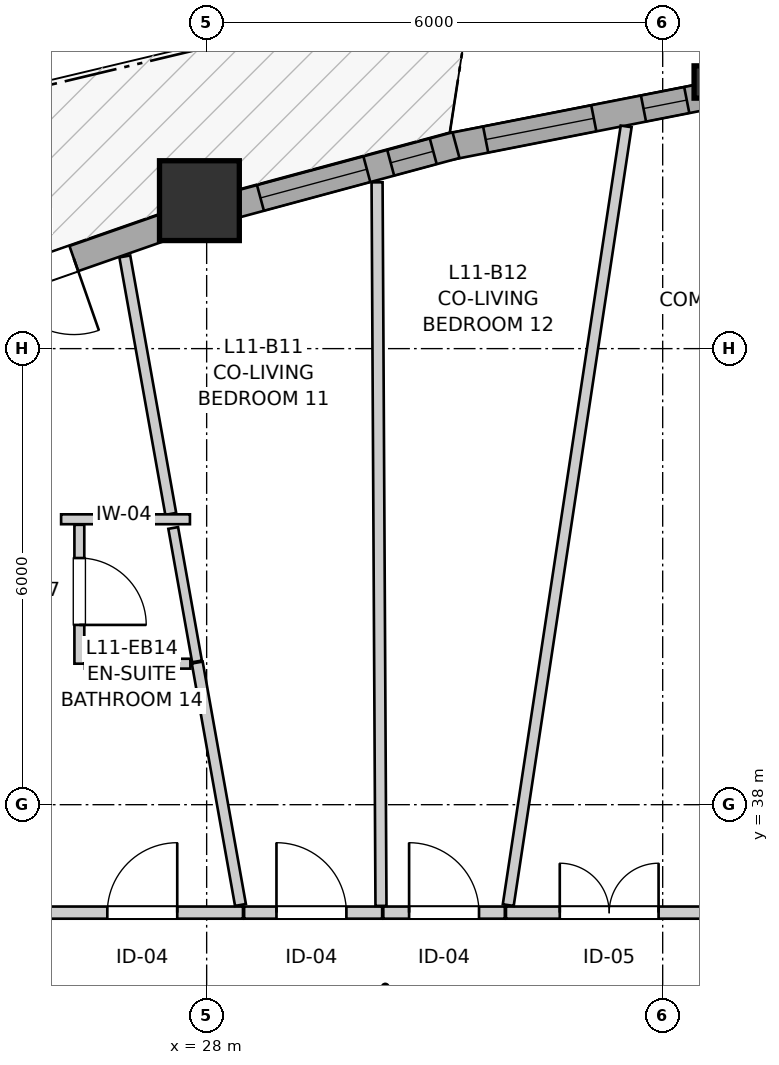
"""IFC4 building model, lengths in metres.
Left out: names, types, materials, properties, quantities, classifications, styles, units other than length and angle.
Written with IfcOpenShell. Run it as: python <this file> out.ifc"""

import sys

from ifc_helpers import new_model, si_unit, direction, frame, frame_2d, origin, origin_2d, place, context, subcontext, project, spatial, rectangle, i_section, extrude, source, transform, mapped, element, fill, save


model = new_model("IFC4")
c1 = context("Model", 3, precision=1e-05, world=origin(), true_north=direction((0.0, 1.0)))
c2 = subcontext(c1, "Body", "Model", "MODEL_VIEW")
j1 = project(units=[si_unit("LENGTHUNIT", "METRE"), si_unit("PLANEANGLEUNIT", "RADIAN")], contexts=[c1])
p1 = place(None, origin())
s1 = spatial("IfcSite", under=j1, at=p1, CompositionType="ELEMENT")
p2 = place(p1, origin())
s2 = spatial("IfcBuilding", under=s1, at=p2, CompositionType="ELEMENT")
p3 = place(p2, frame((0.0, 0.0, 39.8)))
s3 = spatial("IfcBuildingStorey", under=s2, at=p3, CompositionType="ELEMENT", Elevation=39.8)
m1 = source(origin(), c2, "Body", "SweptSolid", [
    extrude(i_section(OverallWidth=0.409, OverallDepth=0.425, WebThickness=0.03, FlangeThickness=0.048, FilletRadius=0.015, at=origin_2d()), origin(), (0.0, 0.0, 1.0), 2.94),
])
p4 = place(p3, frame((34.617, 47.508, 0.0), z_axis=(0.0, 0.0, 1.0), x_axis=(1.0, 0.0, 0.0)))
e1 = element("IfcColumn", 1, at=p4, inside=s3, PredefinedType="PILASTER", context=c2, shape_type="MappedRepresentation", body=[
    mapped(m1, transform((0.0, 0.0, 0.0), x_axis=(1.0, 0.0, 0.0), y_axis=(0.0, 1.0, 0.0), z_axis=(0.0, 0.0, 1.0), scale=1.0)),
])
m2 = source(origin(), c2, "Body", "SweptSolid", [
    extrude(rectangle(XDim=1.05, YDim=1.05, at=origin_2d()), origin(), (0.0, 0.0, 1.0), 2.94),
])
p5 = place(p3, frame((27.905, 45.947, 0.0), z_axis=(0.0, 0.0, 1.0), x_axis=(1.0, 0.0, 0.0)))
e2 = element("IfcColumn", 2, at=p5, inside=s3, PredefinedType="COLUMN", context=c2, shape_type="MappedRepresentation", body=[
    mapped(m2, transform((0.0, 0.0, 0.0), x_axis=(1.0, 0.0, 0.0), y_axis=(0.0, 1.0, 0.0), z_axis=(0.0, 0.0, 1.0), scale=1.0)),
])
p6 = place(p3, frame((34.632, 47.332, 0.0), z_axis=(0.0, 0.0, 1.0), x_axis=(-0.981234691866, -0.192817217796, 0.0)))
e3 = element("IfcWall", 3, at=p6, inside=s3, PredefinedType="SOLIDWALL", context=c2, shape_type="SweptSolid", body=[
    extrude(rectangle(XDim=3.502, YDim=0.35, at=frame_2d((1.751, 0.0))), origin(), (0.0, 0.0, 1.0), 2.42),
])
p7 = place(p6, frame((0.321, 0.0, 0.82)))
e4 = element("IfcOpeningElement", 4, at=p7, cuts=e3, PredefinedType="OPENING", context=c2, shape_type="SweptSolid", body=[
    extrude(rectangle(XDim=0.58, YDim=1.35, at=frame_2d((0.29, 0.675))), frame((0.0, 0.185, 0.0), z_axis=(0.0, -1.0, 0.0), x_axis=(1.0, 0.0, 0.0)), (0.0, 0.0, 1.0), 0.37),
])
p8 = place(p6, frame((1.567, 0.0, 0.82)))
e5 = element("IfcOpeningElement", 5, at=p8, cuts=e3, PredefinedType="OPENING", context=c2, shape_type="SweptSolid", body=[
    extrude(rectangle(XDim=1.45, YDim=1.25, at=frame_2d((0.725, 0.625))), frame((0.0, 0.185, 0.0), z_axis=(0.0, -1.0, 0.0), x_axis=(1.0, 0.0, 0.0)), (0.0, 0.0, 1.0), 0.37),
])
p9 = place(p3, frame((31.281, 46.677, 0.0), z_axis=(0.0, 0.0, 1.0), x_axis=(-0.965445661484, -0.260604441101, 0.0)))
e6 = element("IfcWall", 6, at=p9, inside=s3, PredefinedType="SOLIDWALL", context=c2, shape_type="SweptSolid", body=[
    extrude(rectangle(XDim=3.15, YDim=0.35, at=frame_2d((1.575, 0.0))), origin(), (0.0, 0.0, 1.0), 2.42),
])
p10 = place(p9, frame((0.31, 0.0, 0.82)))
e7 = element("IfcOpeningElement", 7, at=p10, cuts=e6, PredefinedType="OPENING", context=c2, shape_type="SweptSolid", body=[
    extrude(rectangle(XDim=0.58, YDim=1.35, at=frame_2d((0.29, 0.675))), frame((0.0, 0.185, 0.0), z_axis=(0.0, -1.0, 0.0), x_axis=(1.0, 0.0, 0.0)), (0.0, 0.0, 1.0), 0.37),
])
p11 = place(p9, frame((1.215, 0.0, 0.82)))
e8 = element("IfcOpeningElement", 8, at=p11, cuts=e6, PredefinedType="OPENING", context=c2, shape_type="SweptSolid", body=[
    extrude(rectangle(XDim=1.45, YDim=1.25, at=frame_2d((0.725, 0.625))), frame((0.0, 0.185, 0.0), z_axis=(0.0, -1.0, 0.0), x_axis=(1.0, 0.0, 0.0)), (0.0, 0.0, 1.0), 0.37),
])
p12 = place(p3, frame((27.679, 45.683, 0.0), z_axis=(0.0, 0.0, 1.0), x_axis=(-0.944147093892, -0.32952430122, 0.0)))
e9 = element("IfcWall", 9, at=p12, inside=s3, PredefinedType="SOLIDWALL", context=c2, shape_type="SweptSolid", body=[
    extrude(rectangle(XDim=3.094, YDim=0.35, at=frame_2d((1.547, 0.0))), origin(), (0.0, 0.0, 1.0), 2.42),
])
p13 = place(p12, frame((1.511, 0.0, 0.0)))
e10 = element("IfcOpeningElement", 10, at=p13, cuts=e9, PredefinedType="OPENING", context=c2, shape_type="SweptSolid", body=[
    extrude(rectangle(XDim=1.0, YDim=2.1, at=frame_2d((0.5, 1.05))), frame((0.0, 0.185, 0.0), z_axis=(0.0, -1.0, 0.0), x_axis=(1.0, 0.0, 0.0)), (0.0, 0.0, 1.0), 0.37),
])
p14 = place(p3, frame((31.938, 36.58, 0.0), z_axis=(0.0, 0.0, 1.0), x_axis=(1.0, 0.0, 0.0)))
e11 = element("IfcWall", 11, at=p14, inside=s3, PredefinedType="PARTITIONING", context=c2, shape_type="SweptSolid", body=[
    extrude(rectangle(XDim=2.718, YDim=0.16, at=frame_2d((1.359, 0.0))), origin(), (0.0, 0.0, 1.0), 2.94),
])
p15 = place(p14, frame((0.708, 0.0, 0.0)))
e12 = element("IfcOpeningElement", 12, at=p15, cuts=e11, PredefinedType="OPENING", context=c2, shape_type="SweptSolid", body=[
    extrude(rectangle(XDim=1.3, YDim=2.1, at=frame_2d((0.65, 1.05))), frame((0.0, 0.09, 0.0), z_axis=(0.0, -1.0, 0.0), x_axis=(1.0, 0.0, 0.0)), (0.0, 0.0, 1.0), 0.18),
])
p16 = place(p3, frame((25.874, 36.58, 0.0), z_axis=(0.0, 0.0, 1.0), x_axis=(1.0, 0.0, 0.0)))
e13 = element("IfcWall", 13, at=p16, inside=s3, PredefinedType="PARTITIONING", context=c2, shape_type="SweptSolid", body=[
    extrude(rectangle(XDim=2.604, YDim=0.16, at=frame_2d((1.302, 0.0))), origin(), (0.0, 0.0, 1.0), 2.94),
])
p17 = place(p16, frame((0.819, 0.0, 0.0)))
e14 = element("IfcOpeningElement", 14, at=p17, cuts=e13, PredefinedType="OPENING", context=c2, shape_type="SweptSolid", body=[
    extrude(rectangle(XDim=0.92, YDim=2.1, at=frame_2d((0.46, 1.05))), frame((0.0, 0.09, 0.0), z_axis=(0.0, -1.0, 0.0), x_axis=(1.0, 0.0, 0.0)), (0.0, 0.0, 1.0), 0.18),
])
p18 = place(p3, frame((26.325, 41.682, 0.0), z_axis=(0.0, 0.0, 1.0), x_axis=(0.0, -1.0, 0.0)))
e15 = element("IfcWall", 15, at=p18, inside=s3, PredefinedType="PARTITIONING", context=c2, shape_type="SweptSolid", body=[
    extrude(rectangle(XDim=1.827, YDim=0.13, at=frame_2d((0.914, 0.0))), origin(), (0.0, 0.0, 1.0), 2.94),
])
p19 = place(p18, frame((0.437, 0.0, 0.0)))
e16 = element("IfcOpeningElement", 16, at=p19, cuts=e15, PredefinedType="OPENING", context=c2, shape_type="SweptSolid", body=[
    extrude(rectangle(XDim=0.88, YDim=2.05, at=frame_2d((0.44, 1.025))), frame((0.0, 0.075, 0.0), z_axis=(0.0, -1.0, 0.0), x_axis=(1.0, 0.0, 0.0)), (0.0, 0.0, 1.0), 0.15),
])
p20 = place(p3, frame((28.493, 36.58, 0.0), z_axis=(0.0, 0.0, 1.0), x_axis=(1.0, 0.0, 0.0)))
e17 = element("IfcWall", 17, at=p20, inside=s3, PredefinedType="PARTITIONING", context=c2, shape_type="SweptSolid", body=[
    extrude(rectangle(XDim=1.816, YDim=0.16, at=frame_2d((0.908, 0.0))), origin(), (0.0, 0.0, 1.0), 2.94),
])
p21 = place(p20, frame((0.426, 0.0, 0.0)))
e18 = element("IfcOpeningElement", 18, at=p21, cuts=e17, PredefinedType="OPENING", context=c2, shape_type="SweptSolid", body=[
    extrude(rectangle(XDim=0.92, YDim=2.1, at=frame_2d((0.46, 1.05))), frame((0.0, 0.09, 0.0), z_axis=(0.0, -1.0, 0.0), x_axis=(1.0, 0.0, 0.0)), (0.0, 0.0, 1.0), 0.18),
])
p22 = place(p3, frame((30.324, 36.58, 0.0), z_axis=(0.0, 0.0, 1.0), x_axis=(1.0, 0.0, 0.0)))
e19 = element("IfcWall", 19, at=p22, inside=s3, PredefinedType="PARTITIONING", context=c2, shape_type="SweptSolid", body=[
    extrude(rectangle(XDim=1.599, YDim=0.16, at=frame_2d((0.8, 0.0))), origin(), (0.0, 0.0, 1.0), 2.94),
])
p23 = place(p22, frame((0.34, 0.0, 0.0)))
e20 = element("IfcOpeningElement", 20, at=p23, cuts=e19, PredefinedType="OPENING", context=c2, shape_type="SweptSolid", body=[
    extrude(rectangle(XDim=0.92, YDim=2.1, at=frame_2d((0.46, 1.05))), frame((0.0, 0.09, 0.0), z_axis=(0.0, -1.0, 0.0), x_axis=(1.0, 0.0, 0.0)), (0.0, 0.0, 1.0), 0.18),
])
p24 = place(p3, frame((31.968, 36.679, 0.0), z_axis=(0.0, 0.0, 1.0), x_axis=(0.149735581821, 0.9887260771, 0.0)))
e21 = element("IfcWall", 21, at=p24, inside=s3, PredefinedType="PARTITIONING", context=c2, shape_type="SweptSolid", body=[
    extrude(rectangle(XDim=10.362, YDim=0.145, at=frame_2d((5.181, 0.0))), origin(), (0.0, 0.0, 1.0), 2.94),
])
p25 = place(p3, frame((30.242, 46.188, 0.0), z_axis=(0.0, 0.0, 1.0), x_axis=(0.00538564204, -0.999985497325, 0.0)))
e22 = element("IfcWall", 22, at=p25, inside=s3, PredefinedType="PARTITIONING", context=c2, shape_type="SweptSolid", body=[
    extrude(rectangle(XDim=9.52, YDim=0.145, at=frame_2d((4.76, 0.0))), origin(), (0.0, 0.0, 1.0), 2.94),
])
p26 = place(p3, frame((26.923, 45.213, 0.0), z_axis=(0.0, 0.0, 1.0), x_axis=(0.175687492323, -0.98444598889, 0.0)))
e23 = element("IfcWall", 23, at=p26, inside=s3, PredefinedType="PARTITIONING", context=c2, shape_type="SweptSolid", body=[
    extrude(rectangle(XDim=3.441, YDim=0.145, at=frame_2d((1.72, 0.0))), origin(), (0.0, 0.0, 1.0), 2.94),
])
p27 = place(p3, frame((27.876, 39.87, 0.0), z_axis=(0.0, 0.0, 1.0), x_axis=(0.175655014507, -0.984451784436, 0.0)))
e24 = element("IfcWall", 24, at=p27, inside=s3, PredefinedType="PARTITIONING", context=c2, shape_type="SweptSolid", body=[
    extrude(rectangle(XDim=3.24, YDim=0.145, at=frame_2d((1.62, 0.0))), origin(), (0.0, 0.0, 1.0), 2.94),
])
p28 = place(p3, frame((27.56, 41.641, 0.0), z_axis=(0.0, 0.0, 1.0), x_axis=(0.175463771609, -0.9844858886, 0.0)))
e25 = element("IfcWall", 25, at=p28, inside=s3, PredefinedType="PARTITIONING", context=c2, shape_type="SweptSolid", body=[
    extrude(rectangle(XDim=1.784, YDim=0.13, at=frame_2d((0.892, 0.0))), origin(), (0.0, 0.0, 1.0), 2.94),
])
p29 = place(p3, frame((26.398, 39.855, 0.0), z_axis=(0.0, 0.0, 1.0), x_axis=(1.0, 0.0, 0.0)))
e26 = element("IfcWall", 26, at=p29, inside=s3, PredefinedType="PARTITIONING", context=c2, shape_type="SweptSolid", body=[
    extrude(rectangle(XDim=1.388, YDim=0.13, at=frame_2d((0.694, 0.0))), origin(), (0.0, 0.0, 1.0), 2.94),
])
p30 = place(p3, frame((26.085, 41.755, 0.0), z_axis=(0.0, 0.0, 1.0), x_axis=(1.0, 0.0, 0.0)))
e27 = element("IfcWall", 27, at=p30, inside=s3, PredefinedType="PARTITIONING", context=c2, shape_type="SweptSolid", body=[
    extrude(rectangle(XDim=1.695, YDim=0.13, at=frame_2d((0.848, 0.0))), origin(), (0.0, 0.0, 1.0), 2.508),
])
m3 = source(origin(), c2, "Body", "SweptSolid", [
    extrude(rectangle(XDim=0.58, YDim=1.35, at=frame_2d((0.29, 0.675))), frame((0.0, 0.03, 0.0), z_axis=(0.0, -1.0, 0.0), x_axis=(1.0, 0.0, 0.0)), (0.0, 0.0, 1.0), 0.06),
])
p31 = place(p7, origin())
e28 = element("IfcWindow", 28, at=p31, inside=s3, PartitioningType="SINGLE_PANEL", PredefinedType="WINDOW", context=c2, shape_type="MappedRepresentation", body=[
    mapped(m3, transform((0.0, 0.0, 0.0), x_axis=(1.0, 0.0, 0.0), y_axis=(0.0, 1.0, 0.0), z_axis=(0.0, 0.0, 1.0), scale=1.0)),
])
fill(e4, e28)
m4 = source(origin(), c2, "Body", "SweptSolid", [
    extrude(rectangle(XDim=1.45, YDim=1.25, at=frame_2d((0.725, 0.625))), frame((0.0, 0.03, 0.0), z_axis=(0.0, -1.0, 0.0), x_axis=(1.0, 0.0, 0.0)), (0.0, 0.0, 1.0), 0.06),
])
p32 = place(p8, origin())
e29 = element("IfcWindow", 29, at=p32, inside=s3, PartitioningType="SINGLE_PANEL", PredefinedType="WINDOW", context=c2, shape_type="MappedRepresentation", body=[
    mapped(m4, transform((0.0, 0.0, 0.0), x_axis=(1.0, 0.0, 0.0), y_axis=(0.0, 1.0, 0.0), z_axis=(0.0, 0.0, 1.0), scale=1.0)),
])
fill(e5, e29)
p33 = place(p10, origin())
e30 = element("IfcWindow", 30, at=p33, inside=s3, PartitioningType="SINGLE_PANEL", PredefinedType="WINDOW", context=c2, shape_type="MappedRepresentation", body=[
    mapped(m3, transform((0.0, 0.0, 0.0), x_axis=(1.0, 0.0, 0.0), y_axis=(0.0, 1.0, 0.0), z_axis=(0.0, 0.0, 1.0), scale=1.0)),
])
fill(e7, e30)
p34 = place(p11, origin())
e31 = element("IfcWindow", 31, at=p34, inside=s3, PartitioningType="SINGLE_PANEL", PredefinedType="WINDOW", context=c2, shape_type="MappedRepresentation", body=[
    mapped(m4, transform((0.0, 0.0, 0.0), x_axis=(1.0, 0.0, 0.0), y_axis=(0.0, 1.0, 0.0), z_axis=(0.0, 0.0, 1.0), scale=1.0)),
])
fill(e8, e31)
m5 = source(origin(), c2, "Body", "SweptSolid", [
    extrude(rectangle(XDim=1.0, YDim=2.1, at=frame_2d((0.5, 1.05))), frame((0.0, 0.025, 0.0), z_axis=(0.0, -1.0, 0.0), x_axis=(1.0, 0.0, 0.0)), (0.0, 0.0, 1.0), 0.05),
])
p35 = place(p13, origin())
e32 = element("IfcDoor", 32, at=p35, inside=s3, OperationType="SINGLE_SWING_LEFT", PredefinedType="DOOR", context=c2, shape_type="MappedRepresentation", body=[
    mapped(m5, transform((0.0, 0.0, 0.0), x_axis=(1.0, 0.0, 0.0), y_axis=(0.0, 1.0, 0.0), z_axis=(0.0, 0.0, 1.0), scale=1.0)),
])
fill(e10, e32)
m6 = source(origin(), c2, "Body", "SweptSolid", [
    extrude(rectangle(XDim=1.3, YDim=2.1, at=frame_2d((0.65, 1.05))), frame((0.0, 0.025, 0.0), z_axis=(0.0, -1.0, 0.0), x_axis=(1.0, 0.0, 0.0)), (0.0, 0.0, 1.0), 0.05),
])
p36 = place(p15, origin())
e33 = element("IfcDoor", 33, at=p36, inside=s3, OperationType="DOUBLE_DOOR_SINGLE_SWING", PredefinedType="DOOR", context=c2, shape_type="MappedRepresentation", body=[
    mapped(m6, transform((0.0, 0.0, 0.0), x_axis=(1.0, 0.0, 0.0), y_axis=(0.0, 1.0, 0.0), z_axis=(0.0, 0.0, 1.0), scale=1.0)),
])
fill(e12, e33)
m7 = source(origin(), c2, "Body", "SweptSolid", [
    extrude(rectangle(XDim=0.92, YDim=2.1, at=frame_2d((0.46, 1.05))), frame((0.0, 0.025, 0.0), z_axis=(0.0, -1.0, 0.0), x_axis=(1.0, 0.0, 0.0)), (0.0, 0.0, 1.0), 0.05),
])
p37 = place(p17, origin())
e34 = element("IfcDoor", 34, at=p37, inside=s3, OperationType="SINGLE_SWING_RIGHT", PredefinedType="DOOR", context=c2, shape_type="MappedRepresentation", body=[
    mapped(m7, transform((0.0, 0.0, 0.0), x_axis=(1.0, 0.0, 0.0), y_axis=(0.0, 1.0, 0.0), z_axis=(0.0, 0.0, 1.0), scale=1.0)),
])
fill(e14, e34)
m8 = source(origin(), c2, "Body", "SweptSolid", [
    extrude(rectangle(XDim=0.88, YDim=2.05, at=frame_2d((0.44, 1.025))), frame((0.0, 0.025, 0.0), z_axis=(0.0, -1.0, 0.0), x_axis=(1.0, 0.0, 0.0)), (0.0, 0.0, 1.0), 0.05),
])
p38 = place(p19, origin())
e35 = element("IfcDoor", 35, at=p38, inside=s3, OperationType="SINGLE_SWING_RIGHT", PredefinedType="DOOR", context=c2, shape_type="MappedRepresentation", body=[
    mapped(m8, transform((0.0, 0.0, 0.0), x_axis=(1.0, 0.0, 0.0), y_axis=(0.0, 1.0, 0.0), z_axis=(0.0, 0.0, 1.0), scale=1.0)),
])
fill(e16, e35)
p39 = place(p21, origin())
e36 = element("IfcDoor", 36, at=p39, inside=s3, OperationType="SINGLE_SWING_LEFT", PredefinedType="DOOR", context=c2, shape_type="MappedRepresentation", body=[
    mapped(m7, transform((0.0, 0.0, 0.0), x_axis=(1.0, 0.0, 0.0), y_axis=(0.0, 1.0, 0.0), z_axis=(0.0, 0.0, 1.0), scale=1.0)),
])
fill(e18, e36)
p40 = place(p23, origin())
e37 = element("IfcDoor", 37, at=p40, inside=s3, OperationType="SINGLE_SWING_LEFT", PredefinedType="DOOR", context=c2, shape_type="MappedRepresentation", body=[
    mapped(m7, transform((0.0, 0.0, 0.0), x_axis=(1.0, 0.0, 0.0), y_axis=(0.0, 1.0, 0.0), z_axis=(0.0, 0.0, 1.0), scale=1.0)),
])
fill(e20, e37)
save(model, sys.argv[1])
